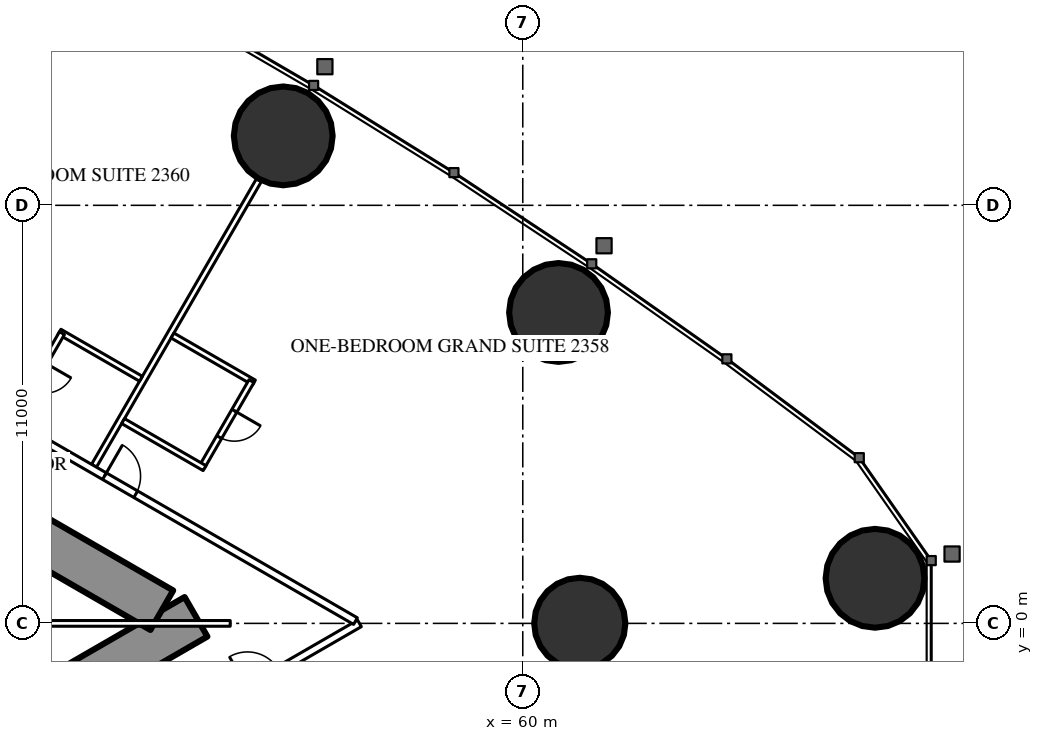
"""IFC4 building model, lengths in metres.
Left out: names, types, materials, properties, quantities, classifications, styles, units other than length and angle.
Written with IfcOpenShell. Run it as: python <this file> out.ifc"""

import sys

from ifc_helpers import new_model, si_unit, direction, frame, frame_2d, origin, origin_2d, place, context, subcontext, project, spatial, rectangle, circle, hollow_circle, extrude, element, fill, save


model = new_model("IFC4")
c1 = context("Model", 3, precision=1e-05, world=origin(), true_north=direction((0.0, 1.0)))
c2 = subcontext(c1, "Body", "Model", "MODEL_VIEW")
j1 = project(units=[si_unit("LENGTHUNIT", "METRE"), si_unit("PLANEANGLEUNIT", "RADIAN")], contexts=[c1])
p1 = place(None, origin())
s1 = spatial("IfcSite", under=j1, at=p1, CompositionType="ELEMENT")
p2 = place(p1, origin())
s2 = spatial("IfcBuilding", under=s1, at=p2, CompositionType="ELEMENT")
p3 = place(p2, frame((0.0, 0.0, 90.6)))
s3 = spatial("IfcBuildingStorey", under=s2, at=p3, CompositionType="ELEMENT", Elevation=90.6)
for number, where, z_axis, x_axis in (
    (1, (69.269, 1.187, 0.0), (0.0, 0.0, 1.0), (1.0, 0.0, 0.0)),
    (2, (60.941, 8.181, 0.0), (0.0, 0.0, 1.0), (1.0, 0.0, 0.0)),
    (3, (53.697, 12.827, 0.0), (0.0, 0.0, 1.0), (1.0, 0.0, 0.0)),
):
    element("IfcColumn", number, at=place(p3, frame(where, z_axis=z_axis, x_axis=x_axis)), inside=s3, PredefinedType="COLUMN", context=c2, shape_type="SweptSolid", body=[
        extrude(hollow_circle(Radius=1.3, WallThickness=0.1, at=origin_2d()), origin(), (0.0, 0.0, 1.0), 3.5),
    ])
p4 = place(p3, frame((61.5, 0.0, 0.0), z_axis=(0.0, 0.0, 1.0), x_axis=(1.0, 0.0, 0.0)))
e4 = element("IfcColumn", 4, at=p4, inside=s3, PredefinedType="COLUMN", context=c2, shape_type="SweptSolid", body=[
    extrude(circle(Radius=1.2, at=origin_2d()), origin(), (0.0, 0.0, 1.0), 3.5),
])
p5 = place(p3, frame((27.2, -13.8, 0.0), z_axis=(0.0, 0.0, 1.0), x_axis=(0.866027159892, 0.499996958321, 0.0)))
e5 = element("IfcWall", 5, at=p5, inside=s3, PredefinedType="SHEAR", context=c2, shape_type="SweptSolid", body=[
    extrude(rectangle(XDim=27.947, YDim=1.2, at=frame_2d((13.973, 0.0))), origin(), (0.0, 0.0, 1.0), 3.5),
])
p6 = place(p5, frame((4.6, 0.0, 0.0)))
e6 = element("IfcOpeningElement", 6, at=p6, cuts=e5, PredefinedType="OPENING", context=c2, shape_type="SweptSolid", body=[
    extrude(rectangle(XDim=1.0, YDim=2.2, at=frame_2d((0.5, 1.1))), frame((0.0, 0.61, 0.0), z_axis=(0.0, -1.0, 0.0), x_axis=(1.0, 0.0, 0.0)), (0.0, 0.0, 1.0), 1.22),
])
p7 = place(p5, frame((13.395, 0.0, 0.0)))
e7 = element("IfcOpeningElement", 7, at=p7, cuts=e5, PredefinedType="OPENING", context=c2, shape_type="SweptSolid", body=[
    extrude(rectangle(XDim=1.8, YDim=2.2, at=frame_2d((0.9, 1.1))), frame((0.0, 0.61, 0.0), z_axis=(0.0, -1.0, 0.0), x_axis=(1.0, 0.0, 0.0)), (0.0, 0.0, 1.0), 1.22),
])
p8 = place(p3, frame((27.2, 13.8, 0.0), z_axis=(0.0, 0.0, 1.0), x_axis=(0.866024515034, -0.500001539357, 0.0)))
e8 = element("IfcWall", 8, at=p8, inside=s3, PredefinedType="SHEAR", context=c2, shape_type="SweptSolid", body=[
    extrude(rectangle(XDim=26.907, YDim=1.2, at=frame_2d((13.454, 0.0))), origin(), (0.0, 0.0, 1.0), 3.5),
])
p9 = place(p8, frame((4.6, 0.0, 0.0)))
e9 = element("IfcOpeningElement", 9, at=p9, cuts=e8, PredefinedType="OPENING", context=c2, shape_type="SweptSolid", body=[
    extrude(rectangle(XDim=1.0, YDim=2.2, at=frame_2d((0.5, 1.1))), frame((0.0, 0.61, 0.0), z_axis=(0.0, -1.0, 0.0), x_axis=(1.0, 0.0, 0.0)), (0.0, 0.0, 1.0), 1.22),
])
p10 = place(p8, frame((13.395, 0.0, 0.0)))
e10 = element("IfcOpeningElement", 10, at=p10, cuts=e8, PredefinedType="OPENING", context=c2, shape_type="SweptSolid", body=[
    extrude(rectangle(XDim=1.8, YDim=2.2, at=frame_2d((0.9, 1.1))), frame((0.0, 0.61, 0.0), z_axis=(0.0, -1.0, 0.0), x_axis=(1.0, 0.0, 0.0)), (0.0, 0.0, 1.0), 1.22),
])
p11 = place(p3, frame((48.719, 4.147, 0.0), z_axis=(0.0, 0.0, 1.0), x_axis=(0.499993328235, 0.866029255696, 0.0)))
e11 = element("IfcWall", 11, at=p11, inside=s3, PredefinedType="PARTITIONING", context=c2, shape_type="SweptSolid", body=[
    extrude(rectangle(XDim=8.686, YDim=0.15, at=frame_2d((4.343, 0.0))), origin(), (0.0, 0.0, 1.0), 2.2),
])
p12 = place(p3, frame((37.96, -10.243, 0.0), z_axis=(0.0, 0.0, 1.0), x_axis=(0.866026429433, 0.499998223521, 0.0)))
e12 = element("IfcWall", 12, at=p12, inside=s3, PredefinedType="PARTITIONING", context=c2, shape_type="SweptSolid", body=[
    extrude(rectangle(XDim=20.487, YDim=0.2, at=frame_2d((10.243, 0.0))), origin(), (0.0, 0.0, 1.0), 3.25),
])
p13 = place(p12, frame((4.047, 0.0, 0.0)))
e13 = element("IfcOpeningElement", 13, at=p13, cuts=e12, PredefinedType="OPENING", context=c2, shape_type="SweptSolid", body=[
    extrude(rectangle(XDim=0.95, YDim=2.2, at=frame_2d((0.475, 1.1))), frame((0.0, 0.11, 0.0), z_axis=(0.0, -1.0, 0.0), x_axis=(1.0, 0.0, 0.0)), (0.0, 0.0, 1.0), 0.22),
])
p14 = place(p12, frame((11.04, 0.0, 0.0)))
e14 = element("IfcOpeningElement", 14, at=p14, cuts=e12, PredefinedType="OPENING", context=c2, shape_type="SweptSolid", body=[
    extrude(rectangle(XDim=0.95, YDim=2.2, at=frame_2d((0.475, 1.1))), frame((0.0, 0.11, 0.0), z_axis=(0.0, -1.0, 0.0), x_axis=(1.0, 0.0, 0.0)), (0.0, 0.0, 1.0), 0.22),
])
p15 = place(p12, frame((13.035, 0.0, 0.0)))
e15 = element("IfcOpeningElement", 15, at=p15, cuts=e12, PredefinedType="OPENING", context=c2, shape_type="SweptSolid", body=[
    extrude(rectangle(XDim=0.95, YDim=2.2, at=frame_2d((0.475, 1.1))), frame((0.0, 0.11, 0.0), z_axis=(0.0, -1.0, 0.0), x_axis=(1.0, 0.0, 0.0)), (0.0, 0.0, 1.0), 0.22),
])
p16 = place(p12, frame((17.085, 0.0, 0.0)))
e16 = element("IfcOpeningElement", 16, at=p16, cuts=e12, PredefinedType="OPENING", context=c2, shape_type="SweptSolid", body=[
    extrude(rectangle(XDim=0.95, YDim=2.2, at=frame_2d((0.475, 1.1))), frame((0.0, 0.11, 0.0), z_axis=(0.0, -1.0, 0.0), x_axis=(1.0, 0.0, 0.0)), (0.0, 0.0, 1.0), 0.22),
])
p17 = place(p12, frame((1.048, 0.0, 0.0)))
e17 = element("IfcOpeningElement", 17, at=p17, cuts=e12, PredefinedType="OPENING", context=c2, shape_type="SweptSolid", body=[
    extrude(rectangle(XDim=1.8, YDim=2.2, at=frame_2d((0.9, 1.1))), frame((0.0, 0.11, 0.0), z_axis=(0.0, -1.0, 0.0), x_axis=(1.0, 0.0, 0.0)), (0.0, 0.0, 1.0), 0.22),
])
p18 = place(p3, frame((36.834, 10.894, 0.0), z_axis=(0.0, 0.0, 1.0), x_axis=(0.866028157229, -0.499995230863, 0.0)))
e18 = element("IfcWall", 18, at=p18, inside=s3, PredefinedType="PARTITIONING", context=c2, shape_type="SweptSolid", body=[
    extrude(rectangle(XDim=21.667, YDim=0.2, at=frame_2d((10.833, 0.0))), origin(), (0.0, 0.0, 1.0), 3.25),
])
p19 = place(p18, frame((14.04, 0.0, 0.0)))
e19 = element("IfcOpeningElement", 19, at=p19, cuts=e18, PredefinedType="OPENING", context=c2, shape_type="SweptSolid", body=[
    extrude(rectangle(XDim=0.95, YDim=2.2, at=frame_2d((0.475, 1.1))), frame((0.0, 0.11, 0.0), z_axis=(0.0, -1.0, 0.0), x_axis=(1.0, 0.0, 0.0)), (0.0, 0.0, 1.0), 0.22),
])
p20 = place(p18, frame((9.99, 0.0, 0.0)))
e20 = element("IfcOpeningElement", 20, at=p20, cuts=e18, PredefinedType="OPENING", context=c2, shape_type="SweptSolid", body=[
    extrude(rectangle(XDim=0.95, YDim=2.2, at=frame_2d((0.475, 1.1))), frame((0.0, 0.11, 0.0), z_axis=(0.0, -1.0, 0.0), x_axis=(1.0, 0.0, 0.0)), (0.0, 0.0, 1.0), 0.22),
])
p21 = place(p18, frame((3.35, 0.0, 0.0)))
e21 = element("IfcOpeningElement", 21, at=p21, cuts=e18, PredefinedType="OPENING", context=c2, shape_type="SweptSolid", body=[
    extrude(rectangle(XDim=1.0, YDim=2.2, at=frame_2d((0.5, 1.1))), frame((0.0, 0.11, 0.0), z_axis=(0.0, -1.0, 0.0), x_axis=(1.0, 0.0, 0.0)), (0.0, 0.0, 1.0), 0.22),
])
p22 = place(p3, frame((50.783, 7.574, 0.0), z_axis=(0.0, 0.0, 1.0), x_axis=(0.866006523861, -0.500032699561, 0.0)))
e22 = element("IfcWall", 22, at=p22, inside=s3, PredefinedType="PARTITIONING", context=c2, shape_type="SweptSolid", body=[
    extrude(rectangle(XDim=2.475, YDim=0.15, at=frame_2d((1.237, 0.0))), origin(), (0.0, 0.0, 1.0), 3.25),
])
p23 = place(p3, frame((51.562, 4.123, 0.0), z_axis=(0.0, 0.0, 1.0), x_axis=(0.49997716683, 0.86603858612, 0.0)))
e23 = element("IfcWall", 23, at=p23, inside=s3, PredefinedType="PARTITIONING", context=c2, shape_type="SweptSolid", body=[
    extrude(rectangle(XDim=2.6, YDim=0.15, at=frame_2d((1.3, 0.0))), origin(), (0.0, 0.0, 1.0), 3.25),
])
p24 = place(p23, frame((0.9, 0.0, 0.0)))
e24 = element("IfcOpeningElement", 24, at=p24, cuts=e23, PredefinedType="OPENING", context=c2, shape_type="SweptSolid", body=[
    extrude(rectangle(XDim=0.8, YDim=2.2, at=frame_2d((0.4, 1.1))), frame((0.0, 0.085, 0.0), z_axis=(0.0, -1.0, 0.0), x_axis=(1.0, 0.0, 0.0)), (0.0, 0.0, 1.0), 0.17),
])
for number, where, z_axis, x_axis in (
    (25, (49.483, 5.323, 0.0), (0.0, 0.0, 1.0), (0.866, -0.5, 0.0)),
    (26, (47.81, 7.674, 0.0), (0.0, 0.0, 1.0), (0.866, -0.5, 0.0)),
):
    element("IfcWall", number, at=place(p3, frame(where, z_axis=z_axis, x_axis=x_axis)), inside=s3, PredefinedType="PARTITIONING", context=c2, shape_type="SweptSolid", body=[
        extrude(rectangle(XDim=2.475, YDim=0.15, at=frame_2d((1.238, 0.0))), origin(), (0.0, 0.0, 1.0), 3.25),
    ])
p25 = place(p3, frame((46.575, 5.385, 0.0), z_axis=(0.0, 0.0, 1.0), x_axis=(0.500006934395, 0.866021400173, 0.0)))
e27 = element("IfcWall", 27, at=p25, inside=s3, PredefinedType="PARTITIONING", context=c2, shape_type="SweptSolid", body=[
    extrude(rectangle(XDim=2.6, YDim=0.15, at=frame_2d((1.3, 0.0))), origin(), (0.0, 0.0, 1.0), 3.25),
])
p26 = place(p25, frame((0.9, 0.0, 0.0)))
e28 = element("IfcOpeningElement", 28, at=p26, cuts=e27, PredefinedType="OPENING", context=c2, shape_type="SweptSolid", body=[
    extrude(rectangle(XDim=0.8, YDim=2.2, at=frame_2d((0.4, 1.1))), frame((0.0, 0.085, 0.0), z_axis=(0.0, -1.0, 0.0), x_axis=(1.0, 0.0, 0.0)), (0.0, 0.0, 1.0), 0.17),
])
p27 = place(p3, frame((44.575, 0.0, 0.0), z_axis=(0.0, 0.0, 1.0), x_axis=(1.0, 0.0, 0.0)))
e29 = element("IfcWall", 29, at=p27, inside=s3, PredefinedType="PARTITIONING", context=c2, shape_type="SweptSolid", body=[
    extrude(rectangle(XDim=7.727, YDim=0.15, at=frame_2d((3.864, 0.0))), origin(), (0.0, 0.0, 1.0), 2.2),
])
p28 = place(p24, origin())
e30 = element("IfcDoor", 30, at=p28, inside=s3, OperationType="SINGLE_SWING_RIGHT", PredefinedType="DOOR", context=c2, shape_type="SweptSolid", body=[
    extrude(rectangle(XDim=0.8, YDim=2.2, at=frame_2d((0.4, 1.1))), frame((0.0, 0.025, 0.0), z_axis=(0.0, -1.0, 0.0), x_axis=(1.0, 0.0, 0.0)), (0.0, 0.0, 1.0), 0.05),
])
fill(e24, e30)
p29 = place(p19, origin())
e31 = element("IfcDoor", 31, at=p29, inside=s3, OperationType="SINGLE_SWING_LEFT", PredefinedType="DOOR", context=c2, shape_type="SweptSolid", body=[
    extrude(rectangle(XDim=0.95, YDim=2.2, at=frame_2d((0.475, 1.1))), frame((0.0, 0.025, 0.0), z_axis=(0.0, -1.0, 0.0), x_axis=(1.0, 0.0, 0.0)), (0.0, 0.0, 1.0), 0.05),
])
fill(e19, e31)
save(model, sys.argv[1])
